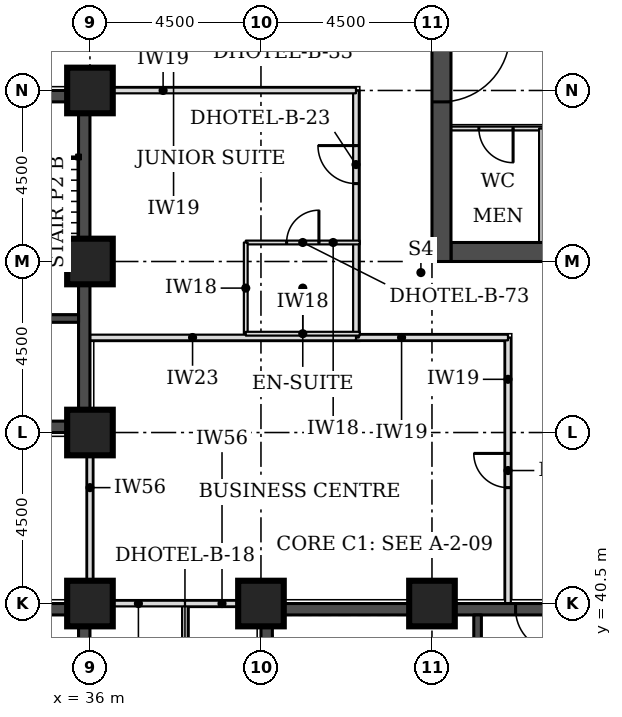
"""IFC4 building model, lengths in metres.
Left out: names, types, materials, properties, quantities, classifications, styles, units other than length and angle.
Written with IfcOpenShell. Run it as: python <this file> out.ifc"""

import sys

from ifc_helpers import new_model, si_unit, direction, frame, frame_2d, origin, origin_2d, place, context, subcontext, project, spatial, rectangle, extrude, element, fill, save


model = new_model("IFC4")
c1 = context("Model", 3, precision=1e-05, world=origin(), true_north=direction((0.0, 1.0)))
c2 = subcontext(c1, "Body", "Model", "MODEL_VIEW")
j1 = project(units=[si_unit("LENGTHUNIT", "METRE"), si_unit("PLANEANGLEUNIT", "RADIAN")], contexts=[c1])
p1 = place(None, origin())
s1 = spatial("IfcSite", under=j1, at=p1, CompositionType="ELEMENT")
p2 = place(p1, origin())
s2 = spatial("IfcBuilding", under=s1, at=p2, CompositionType="ELEMENT")
p3 = place(p2, frame((0.0, 0.0, 29.7)))
s3 = spatial("IfcBuildingStorey", under=s2, at=p3, CompositionType="ELEMENT", Elevation=29.7)
for number, where, z_axis, x_axis in (
    (1, (36.0, 40.5, 0.0), (0.0, 0.0, 1.0), (1.0, 0.0, 0.0)),
    (2, (40.5, 40.5, 0.0), (0.0, 0.0, 1.0), (1.0, 0.0, 0.0)),
    (3, (45.0, 40.5, 0.0), (0.0, 0.0, 1.0), (1.0, 0.0, 0.0)),
    (4, (36.0, 45.0, 0.0), (0.0, 0.0, 1.0), (1.0, 0.0, 0.0)),
    (5, (36.0, 49.5, 0.0), (0.0, 0.0, 1.0), (1.0, 0.0, 0.0)),
    (6, (36.0, 54.0, 0.0), (0.0, 0.0, 1.0), (1.0, 0.0, 0.0)),
):
    element("IfcColumn", number, at=place(p3, frame(where, z_axis=z_axis, x_axis=x_axis)), inside=s3, PredefinedType="COLUMN", context=c2, shape_type="SweptSolid", body=[
        extrude(rectangle(XDim=1.2, YDim=1.2, at=origin_2d()), origin(), (0.0, 0.0, 1.0), 3.3),
    ])
p4 = place(p3, frame((45.5, 49.75, 0.0), z_axis=(0.0, 0.0, 1.0), x_axis=(1.0, 0.0, 0.0)))
e7 = element("IfcWall", 7, at=p4, inside=s3, PredefinedType="SHEAR", context=c2, shape_type="SweptSolid", body=[
    extrude(rectangle(XDim=21.5, YDim=0.5, at=frame_2d((10.75, 0.0))), origin(), (0.0, 0.0, 1.0), 3.3),
])
p5 = place(p3, frame((45.25, 49.5, 0.0), z_axis=(0.0, 0.0, 1.0), x_axis=(0.0, 1.0, 0.0)))
e8 = element("IfcWall", 8, at=p5, inside=s3, PredefinedType="SHEAR", context=c2, shape_type="SweptSolid", body=[
    extrude(rectangle(XDim=22.5, YDim=0.5, at=frame_2d((11.25, 0.0))), origin(), (0.0, 0.0, 1.0), 3.3),
])
p6 = place(p5, frame((4.2, 0.0, 0.0)))
e9 = element("IfcOpeningElement", 9, at=p6, cuts=e8, PredefinedType="OPENING", context=c2, shape_type="SweptSolid", body=[
    extrude(rectangle(XDim=1.8, YDim=2.1, at=frame_2d((0.9, 1.05))), frame((0.0, 0.26, 0.0), z_axis=(0.0, -1.0, 0.0), x_axis=(1.0, 0.0, 0.0)), (0.0, 0.0, 1.0), 0.52),
])
p7 = place(p5, frame((6.9, 0.0, 0.0)))
e10 = element("IfcOpeningElement", 10, at=p7, cuts=e8, PredefinedType="OPENING", context=c2, shape_type="SweptSolid", body=[
    extrude(rectangle(XDim=1.1, YDim=2.1, at=frame_2d((0.55, 1.05))), frame((0.0, 0.26, 0.0), z_axis=(0.0, -1.0, 0.0), x_axis=(1.0, 0.0, 0.0)), (0.0, 0.0, 1.0), 0.52),
])
p8 = place(p5, frame((13.6, 0.0, 0.0)))
e11 = element("IfcOpeningElement", 11, at=p8, cuts=e8, PredefinedType="OPENING", context=c2, shape_type="SweptSolid", body=[
    extrude(rectangle(XDim=1.1, YDim=2.1, at=frame_2d((0.55, 1.05))), frame((0.0, 0.26, 0.0), z_axis=(0.0, -1.0, 0.0), x_axis=(1.0, 0.0, 0.0)), (0.0, 0.0, 1.0), 0.52),
])
p9 = place(p5, frame((16.5, 0.0, 0.0)))
e12 = element("IfcOpeningElement", 12, at=p9, cuts=e8, PredefinedType="OPENING", context=c2, shape_type="SweptSolid", body=[
    extrude(rectangle(XDim=1.8, YDim=2.1, at=frame_2d((0.9, 1.05))), frame((0.0, 0.26, 0.0), z_axis=(0.0, -1.0, 0.0), x_axis=(1.0, 0.0, 0.0)), (0.0, 0.0, 1.0), 0.52),
])
p10 = place(p3, frame((27.3, 45.15, 0.0), z_axis=(0.0, 0.0, 1.0), x_axis=(1.0, 0.0, 0.0)))
e13 = element("IfcWall", 13, at=p10, inside=s3, PredefinedType="SHEAR", context=c2, shape_type="SweptSolid", body=[
    extrude(rectangle(XDim=8.4, YDim=0.3, at=frame_2d((4.2, 0.0))), origin(), (0.0, 0.0, 1.0), 3.3),
])
p11 = place(p10, frame((5.2, 0.0, 0.0)))
e14 = element("IfcOpeningElement", 14, at=p11, cuts=e13, PredefinedType="OPENING", context=c2, shape_type="SweptSolid", body=[
    extrude(rectangle(XDim=1.0, YDim=2.1, at=frame_2d((0.5, 1.05))), frame((0.0, 0.16, 0.0), z_axis=(0.0, -1.0, 0.0), x_axis=(1.0, 0.0, 0.0)), (0.0, 0.0, 1.0), 0.32),
])
p12 = place(p3, frame((27.3, 53.85, 0.0), z_axis=(0.0, 0.0, 1.0), x_axis=(1.0, 0.0, 0.0)))
e15 = element("IfcWall", 15, at=p12, inside=s3, PredefinedType="SHEAR", context=c2, shape_type="SweptSolid", body=[
    extrude(rectangle(XDim=8.4, YDim=0.3, at=frame_2d((4.2, 0.0))), origin(), (0.0, 0.0, 1.0), 3.3),
])
p13 = place(p12, frame((6.4, 0.0, 0.0)))
e16 = element("IfcOpeningElement", 16, at=p13, cuts=e15, PredefinedType="OPENING", context=c2, shape_type="SweptSolid", body=[
    extrude(rectangle(XDim=1.1, YDim=2.1, at=frame_2d((0.55, 1.05))), frame((0.0, 0.16, 0.0), z_axis=(0.0, -1.0, 0.0), x_axis=(1.0, 0.0, 0.0)), (0.0, 0.0, 1.0), 0.32),
])
p14 = place(p3, frame((35.85, 45.0, 0.0), z_axis=(0.0, 0.0, 1.0), x_axis=(0.0, 1.0, 0.0)))
e17 = element("IfcWall", 17, at=p14, inside=s3, PredefinedType="SHEAR", context=c2, shape_type="SweptSolid", body=[
    extrude(rectangle(XDim=9.0, YDim=0.3, at=frame_2d((4.5, 0.0))), origin(), (0.0, 0.0, 1.0), 3.3),
])
p15 = place(p3, frame((40.8, 40.35, 0.0), z_axis=(0.0, 0.0, 1.0), x_axis=(1.0, 0.0, 0.0)))
e18 = element("IfcWall", 18, at=p15, inside=s3, PredefinedType="SHEAR", context=c2, shape_type="SweptSolid", body=[
    extrude(rectangle(XDim=8.4, YDim=0.3, at=frame_2d((4.2, 0.0))), origin(), (0.0, 0.0, 1.0), 3.3),
])
p16 = place(p15, frame((6.4, 0.0, 0.0)))
e19 = element("IfcOpeningElement", 19, at=p16, cuts=e18, PredefinedType="OPENING", context=c2, shape_type="SweptSolid", body=[
    extrude(rectangle(XDim=1.1, YDim=2.1, at=frame_2d((0.55, 1.05))), frame((0.0, 0.16, 0.0), z_axis=(0.0, -1.0, 0.0), x_axis=(1.0, 0.0, 0.0)), (0.0, 0.0, 1.0), 0.32),
])
p17 = place(p3, frame((40.65, 31.5, 0.0), z_axis=(0.0, 0.0, 1.0), x_axis=(0.0, 1.0, 0.0)))
e20 = element("IfcWall", 20, at=p17, inside=s3, PredefinedType="SHEAR", context=c2, shape_type="SweptSolid", body=[
    extrude(rectangle(XDim=9.0, YDim=0.3, at=frame_2d((4.5, 0.0))), origin(), (0.0, 0.0, 1.0), 3.3),
])
p18 = place(p17, frame((0.4, 0.0, 0.0)))
e21 = element("IfcOpeningElement", 21, at=p18, cuts=e20, PredefinedType="OPENING", context=c2, shape_type="SweptSolid", body=[
    extrude(rectangle(XDim=1.1, YDim=2.1, at=frame_2d((0.55, 1.05))), frame((0.0, 0.16, 0.0), z_axis=(0.0, -1.0, 0.0), x_axis=(1.0, 0.0, 0.0)), (0.0, 0.0, 1.0), 0.32),
])
p19 = place(p3, frame((27.3, 40.35, 0.0), z_axis=(0.0, 0.0, 1.0), x_axis=(1.0, 0.0, 0.0)))
e22 = element("IfcWall", 22, at=p19, inside=s3, PredefinedType="SHEAR", context=c2, shape_type="SweptSolid", body=[
    extrude(rectangle(XDim=8.4, YDim=0.3, at=frame_2d((4.2, 0.0))), origin(), (0.0, 0.0, 1.0), 3.3),
])
p20 = place(p19, frame((6.4, 0.0, 0.0)))
e23 = element("IfcOpeningElement", 23, at=p20, cuts=e22, PredefinedType="OPENING", context=c2, shape_type="SweptSolid", body=[
    extrude(rectangle(XDim=1.1, YDim=2.1, at=frame_2d((0.55, 1.05))), frame((0.0, 0.16, 0.0), z_axis=(0.0, -1.0, 0.0), x_axis=(1.0, 0.0, 0.0)), (0.0, 0.0, 1.0), 0.32),
])
p21 = place(p3, frame((35.85, 31.5, 0.0), z_axis=(0.0, 0.0, 1.0), x_axis=(0.0, 1.0, 0.0)))
e24 = element("IfcWall", 24, at=p21, inside=s3, PredefinedType="SHEAR", context=c2, shape_type="SweptSolid", body=[
    extrude(rectangle(XDim=9.0, YDim=0.3, at=frame_2d((4.5, 0.0))), origin(), (0.0, 0.0, 1.0), 3.3),
])
p22 = place(p3, frame((38.5, 25.65, 0.0), z_axis=(0.0, 0.0, 1.0), x_axis=(0.0, 1.0, 0.0)))
e25 = element("IfcWall", 25, at=p22, inside=s3, PredefinedType="PARTITIONING", context=c2, shape_type="SweptSolid", body=[
    extrude(rectangle(XDim=14.85, YDim=0.15, at=frame_2d((7.425, 0.0))), origin(), (0.0, 0.0, 1.0), 3.08),
])
p23 = place(p22, frame((7.54, 0.0, 0.0)))
e26 = element("IfcOpeningElement", 26, at=p23, cuts=e25, PredefinedType="OPENING", context=c2, shape_type="SweptSolid", body=[
    extrude(rectangle(XDim=0.9, YDim=2.1, at=frame_2d((0.45, 1.05))), frame((0.0, 0.085, 0.0), z_axis=(0.0, -1.0, 0.0), x_axis=(1.0, 0.0, 0.0)), (0.0, 0.0, 1.0), 0.17),
])
p24 = place(p3, frame((38.5, 40.5, 0.0), z_axis=(0.0, 0.0, 1.0), x_axis=(1.0, 0.0, 0.0)))
e27 = element("IfcWall", 27, at=p24, inside=s3, PredefinedType="PARTITIONING", context=c2, shape_type="SweptSolid", body=[
    extrude(rectangle(XDim=1.95, YDim=0.15, at=frame_2d((0.975, 0.0))), origin(), (0.0, 0.0, 1.0), 2.33),
])
p25 = place(p3, frame((36.0, 40.55, 0.0), z_axis=(0.0, 0.0, 1.0), x_axis=(0.0, 1.0, 0.0)))
e28 = element("IfcWall", 28, at=p25, inside=s3, PredefinedType="PARTITIONING", context=c2, shape_type="SweptSolid", body=[
    extrude(rectangle(XDim=4.4, YDim=0.15, at=frame_2d((2.2, 0.0))), origin(), (0.0, 0.0, 1.0), 2.33),
])
p26 = place(p3, frame((47.0, 40.5, 0.0), z_axis=(0.0, 0.0, 1.0), x_axis=(0.0, 1.0, 0.0)))
e29 = element("IfcWall", 29, at=p26, inside=s3, PredefinedType="PARTITIONING", context=c2, shape_type="SweptSolid", body=[
    extrude(rectangle(XDim=7.0, YDim=0.15, at=frame_2d((3.5, 0.0))), origin(), (0.0, 0.0, 1.0), 3.08),
])
p27 = place(p26, frame((3.05, 0.0, 0.0)))
e30 = element("IfcOpeningElement", 30, at=p27, cuts=e29, PredefinedType="OPENING", context=c2, shape_type="SweptSolid", body=[
    extrude(rectangle(XDim=0.9, YDim=2.1, at=frame_2d((0.45, 1.05))), frame((0.0, 0.085, 0.0), z_axis=(0.0, -1.0, 0.0), x_axis=(1.0, 0.0, 0.0)), (0.0, 0.0, 1.0), 0.17),
])
p28 = place(p3, frame((43.0, 47.5, 0.0), z_axis=(0.0, 0.0, 1.0), x_axis=(1.0, 0.0, 0.0)))
e31 = element("IfcWall", 31, at=p28, inside=s3, PredefinedType="PARTITIONING", context=c2, shape_type="SweptSolid", body=[
    extrude(rectangle(XDim=4.0, YDim=0.15, at=frame_2d((2.0, 0.0))), origin(), (0.0, 0.0, 1.0), 3.08),
])
p29 = place(p3, frame((43.0, 47.5, 0.0), z_axis=(0.0, 0.0, 1.0), x_axis=(0.0, 1.0, 0.0)))
e32 = element("IfcWall", 32, at=p29, inside=s3, PredefinedType="PARTITIONING", context=c2, shape_type="SweptSolid", body=[
    extrude(rectangle(XDim=6.5, YDim=0.15, at=frame_2d((3.25, 0.0))), origin(), (0.0, 0.0, 1.0), 3.08),
])
p30 = place(p29, frame((4.05, 0.0, 0.0)))
e33 = element("IfcOpeningElement", 33, at=p30, cuts=e32, PredefinedType="OPENING", context=c2, shape_type="SweptSolid", body=[
    extrude(rectangle(XDim=1.0, YDim=2.1, at=frame_2d((0.5, 1.05))), frame((0.0, 0.085, 0.0), z_axis=(0.0, -1.0, 0.0), x_axis=(1.0, 0.0, 0.0)), (0.0, 0.0, 1.0), 0.17),
])
p31 = place(p3, frame((36.05, 54.0, 0.0), z_axis=(0.0, 0.0, 1.0), x_axis=(1.0, 0.0, 0.0)))
e34 = element("IfcWall", 34, at=p31, inside=s3, PredefinedType="PARTITIONING", context=c2, shape_type="SweptSolid", body=[
    extrude(rectangle(XDim=6.95, YDim=0.15, at=frame_2d((3.475, 0.0))), origin(), (0.0, 0.0, 1.0), 3.08),
])
p32 = place(p3, frame((36.05, 40.5, 0.0), z_axis=(0.0, 0.0, 1.0), x_axis=(1.0, 0.0, 0.0)))
e35 = element("IfcWall", 35, at=p32, inside=s3, PredefinedType="PARTITIONING", context=c2, shape_type="SweptSolid", body=[
    extrude(rectangle(XDim=2.45, YDim=0.15, at=frame_2d((1.225, 0.0))), origin(), (0.0, 0.0, 1.0), 2.33),
])
p33 = place(p3, frame((36.0, 47.5, 0.0), z_axis=(0.0, 0.0, 1.0), x_axis=(1.0, 0.0, 0.0)))
e36 = element("IfcWall", 36, at=p33, inside=s3, PredefinedType="PARTITIONING", context=c2, shape_type="SweptSolid", body=[
    extrude(rectangle(XDim=7.0, YDim=0.15, at=frame_2d((3.5, 0.0))), origin(), (0.0, 0.0, 1.0), 3.08),
])
p34 = place(p3, frame((43.1, 50.0, 0.0), z_axis=(0.0, 0.0, 1.0), x_axis=(-1.0, 0.0, 0.0)))
e37 = element("IfcWall", 37, at=p34, inside=s3, PredefinedType="PARTITIONING", context=c2, shape_type="SweptSolid", body=[
    extrude(rectangle(XDim=3.0, YDim=0.1, at=frame_2d((1.5, 0.0))), origin(), (0.0, 0.0, 1.0), 3.08),
])
p35 = place(p34, frame((1.075, 0.0, 0.0)))
e38 = element("IfcOpeningElement", 38, at=p35, cuts=e37, PredefinedType="OPENING", context=c2, shape_type="SweptSolid", body=[
    extrude(rectangle(XDim=0.85, YDim=2.1, at=frame_2d((0.425, 1.05))), frame((0.0, 0.06, 0.0), z_axis=(0.0, -1.0, 0.0), x_axis=(1.0, 0.0, 0.0)), (0.0, 0.0, 1.0), 0.12),
])
p36 = place(p3, frame((40.1, 50.0, 0.0), z_axis=(0.0, 0.0, 1.0), x_axis=(0.0, -1.0, 0.0)))
e39 = element("IfcWall", 39, at=p36, inside=s3, PredefinedType="PARTITIONING", context=c2, shape_type="SweptSolid", body=[
    extrude(rectangle(XDim=2.4, YDim=0.1, at=frame_2d((1.2, 0.0))), origin(), (0.0, 0.0, 1.0), 3.08),
])
p37 = place(p3, frame((40.1, 47.6, 0.0), z_axis=(0.0, 0.0, 1.0), x_axis=(1.0, 0.0, 0.0)))
e40 = element("IfcWall", 40, at=p37, inside=s3, PredefinedType="PARTITIONING", context=c2, shape_type="SweptSolid", body=[
    extrude(rectangle(XDim=3.0, YDim=0.1, at=frame_2d((1.5, 0.0))), origin(), (0.0, 0.0, 1.0), 3.08),
])
p38 = place(p3, frame((45.5, 53.0, 0.0), z_axis=(0.0, 0.0, 1.0), x_axis=(1.0, 0.0, 0.0)))
e41 = element("IfcWall", 41, at=p38, inside=s3, PredefinedType="PARTITIONING", context=c2, shape_type="SweptSolid", body=[
    extrude(rectangle(XDim=5.15, YDim=0.1, at=frame_2d((2.575, 0.0))), origin(), (0.0, 0.0, 1.0), 3.08),
])
p39 = place(p38, frame((0.735, 0.0, 0.0)))
e42 = element("IfcOpeningElement", 42, at=p39, cuts=e41, PredefinedType="OPENING", context=c2, shape_type="SweptSolid", body=[
    extrude(rectangle(XDim=0.9, YDim=2.1, at=frame_2d((0.45, 1.05))), frame((0.0, 0.06, 0.0), z_axis=(0.0, -1.0, 0.0), x_axis=(1.0, 0.0, 0.0)), (0.0, 0.0, 1.0), 0.12),
])
p40 = place(p38, frame((3.31, 0.0, 0.0)))
e43 = element("IfcOpeningElement", 43, at=p40, cuts=e41, PredefinedType="OPENING", context=c2, shape_type="SweptSolid", body=[
    extrude(rectangle(XDim=0.9, YDim=2.1, at=frame_2d((0.45, 1.05))), frame((0.0, 0.06, 0.0), z_axis=(0.0, -1.0, 0.0), x_axis=(1.0, 0.0, 0.0)), (0.0, 0.0, 1.0), 0.12),
])
p41 = place(p3, frame((47.869, 50.0, 0.0), z_axis=(0.0, 0.0, 1.0), x_axis=(0.0, 1.0, 0.0)))
e44 = element("IfcWall", 44, at=p41, inside=s3, PredefinedType="PARTITIONING", context=c2, shape_type="SweptSolid", body=[
    extrude(rectangle(XDim=3.0, YDim=0.1, at=frame_2d((1.5, 0.0))), origin(), (0.0, 0.0, 1.0), 3.08),
])
p42 = place(p3, frame((32.7, 48.0, 0.0), z_axis=(0.0, 0.0, 1.0), x_axis=(1.0, 0.0, 0.0)))
e45 = element("IfcWall", 45, at=p42, inside=s3, PredefinedType="SOLIDWALL", context=c2, shape_type="SweptSolid", body=[
    extrude(rectangle(XDim=3.0, YDim=0.2, at=frame_2d((1.5, 0.0))), origin(), (0.0, 0.0, 1.0), 3.08),
])
p43 = place(p3, frame((46.2, 34.5, 0.0), z_axis=(0.0, 0.0, 1.0), x_axis=(0.0, 1.0, 0.0)))
e46 = element("IfcWall", 46, at=p43, inside=s3, PredefinedType="SOLIDWALL", context=c2, shape_type="SweptSolid", body=[
    extrude(rectangle(XDim=5.7, YDim=0.2, at=frame_2d((2.85, 0.0))), origin(), (0.0, 0.0, 1.0), 3.08),
])
p44 = place(p27, origin())
e47 = element("IfcDoor", 47, at=p44, inside=s3, OperationType="SINGLE_SWING_RIGHT", PredefinedType="DOOR", context=c2, shape_type="SweptSolid", body=[
    extrude(rectangle(XDim=0.9, YDim=2.1, at=frame_2d((0.45, 1.05))), frame((0.0, 0.025, 0.0), z_axis=(0.0, -1.0, 0.0), x_axis=(1.0, 0.0, 0.0)), (0.0, 0.0, 1.0), 0.05),
])
fill(e30, e47)
p45 = place(p30, origin())
e48 = element("IfcDoor", 48, at=p45, inside=s3, OperationType="SINGLE_SWING_RIGHT", PredefinedType="DOOR", context=c2, shape_type="SweptSolid", body=[
    extrude(rectangle(XDim=1.0, YDim=2.1, at=frame_2d((0.5, 1.05))), frame((0.0, 0.025, 0.0), z_axis=(0.0, -1.0, 0.0), x_axis=(1.0, 0.0, 0.0)), (0.0, 0.0, 1.0), 0.05),
])
fill(e33, e48)
p46 = place(p35, frame((0.85, 0.0, 0.0), z_axis=(0.0, 0.0, 1.0), x_axis=(-1.0, 0.0, 0.0)))
e49 = element("IfcDoor", 49, at=p46, inside=s3, OperationType="SINGLE_SWING_RIGHT", PredefinedType="DOOR", context=c2, shape_type="SweptSolid", body=[
    extrude(rectangle(XDim=0.85, YDim=2.1, at=frame_2d((0.425, 1.05))), frame((0.0, 0.025, 0.0), z_axis=(0.0, -1.0, 0.0), x_axis=(1.0, 0.0, 0.0)), (0.0, 0.0, 1.0), 0.05),
])
fill(e38, e49)
p47 = place(p6, frame((1.8, 0.0, 0.0), z_axis=(0.0, 0.0, 1.0), x_axis=(-1.0, 0.0, 0.0)))
e50 = element("IfcDoor", 50, at=p47, inside=s3, OperationType="SINGLE_SWING_LEFT", PredefinedType="DOOR", context=c2, shape_type="SweptSolid", body=[
    extrude(rectangle(XDim=1.8, YDim=2.1, at=frame_2d((0.9, 1.05))), frame((0.0, 0.025, 0.0), z_axis=(0.0, -1.0, 0.0), x_axis=(1.0, 0.0, 0.0)), (0.0, 0.0, 1.0), 0.05),
])
fill(e9, e50)
p48 = place(p39, frame((0.9, 0.0, 0.0), z_axis=(0.0, 0.0, 1.0), x_axis=(-1.0, 0.0, 0.0)))
e51 = element("IfcDoor", 51, at=p48, inside=s3, OperationType="SINGLE_SWING_LEFT", PredefinedType="DOOR", context=c2, shape_type="SweptSolid", body=[
    extrude(rectangle(XDim=0.9, YDim=2.1, at=frame_2d((0.45, 1.05))), frame((0.0, 0.025, 0.0), z_axis=(0.0, -1.0, 0.0), x_axis=(1.0, 0.0, 0.0)), (0.0, 0.0, 1.0), 0.05),
])
fill(e42, e51)
p49 = place(p16, frame((1.1, 0.0, 0.0), z_axis=(0.0, 0.0, 1.0), x_axis=(-1.0, 0.0, 0.0)))
e52 = element("IfcDoor", 52, at=p49, inside=s3, OperationType="SINGLE_SWING_LEFT", PredefinedType="DOOR", context=c2, shape_type="SweptSolid", body=[
    extrude(rectangle(XDim=1.1, YDim=2.1, at=frame_2d((0.55, 1.05))), frame((0.0, 0.025, 0.0), z_axis=(0.0, -1.0, 0.0), x_axis=(1.0, 0.0, 0.0)), (0.0, 0.0, 1.0), 0.05),
])
fill(e19, e52)
save(model, sys.argv[1])
